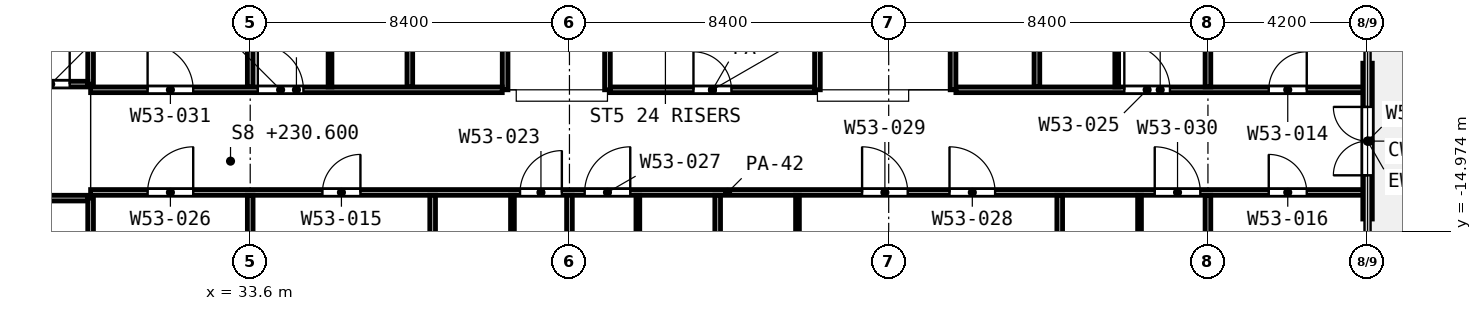
"""IFC4 building model, lengths in metres.
Left out: names, types, materials, properties, quantities, classifications, styles, units other than length and angle.
Written with IfcOpenShell. Run it as: python <this file> out.ifc"""

import sys

from ifc_helpers import new_model, si_unit, direction, frame, frame_2d, origin, place, context, subcontext, project, spatial, rectangle, extrude, element, fill, save


model = new_model("IFC4")
c1 = context("Model", 3, precision=1e-05, world=origin(), true_north=direction((0.0, 1.0)))
c2 = subcontext(c1, "Body", "Model", "MODEL_VIEW")
j1 = project(units=[si_unit("LENGTHUNIT", "METRE"), si_unit("PLANEANGLEUNIT", "RADIAN")], contexts=[c1])
p1 = place(None, origin())
s1 = spatial("IfcSite", under=j1, at=p1, CompositionType="ELEMENT")
p2 = place(p1, origin())
s2 = spatial("IfcBuilding", under=s1, at=p2, CompositionType="ELEMENT")
p3 = place(p2, frame((0.0, 0.0, 230.6)))
s3 = spatial("IfcBuildingStorey", under=s2, at=p3, CompositionType="ELEMENT", Elevation=230.6)
p4 = place(p3, frame((63.0, -14.65, 0.0), z_axis=(0.0, 0.0, 1.0), x_axis=(0.0, 1.0, 0.0)))
e1 = element("IfcWall", 1, at=p4, inside=s3, PredefinedType="SOLIDWALL", context=c2, shape_type="SweptSolid", body=[
    extrude(rectangle(XDim=4.1, YDim=0.25, at=frame_2d((2.05, 0.0))), origin(), (0.0, 0.0, 1.0), 2.58),
])
p5 = place(p4, frame((1.15, 0.0, 0.0)))
e2 = element("IfcOpeningElement", 2, at=p5, cuts=e1, PredefinedType="OPENING", context=c2, shape_type="SweptSolid", body=[
    extrude(rectangle(XDim=1.8, YDim=2.1, at=frame_2d((0.9, 1.05))), frame((0.0, 0.135, 0.0), z_axis=(0.0, -1.0, 0.0), x_axis=(1.0, 0.0, 0.0)), (0.0, 0.0, 1.0), 0.27),
])
for number, where, z_axis, x_axis in (
    (3, (35.7, -11.175, 0.0), (0.0, 0.0, 1.0), (0.0, 1.0, 0.0)),
    (4, (40.5, -16.65, 0.0), (0.0, 0.0, 1.0), (0.0, 1.0, 0.0)),
    (5, (43.8, -16.65, 0.0), (0.0, 0.0, 1.0), (0.0, 1.0, 0.0)),
    (6, (48.0, -16.65, 0.0), (0.0, 0.0, 1.0), (0.0, 1.0, 0.0)),
    (7, (56.4, -11.175, 0.0), (0.0, 0.0, 1.0), (0.0, 1.0, 0.0)),
    (8, (57.0, -16.65, 0.0), (0.0, 0.0, 1.0), (0.0, 1.0, 0.0)),
):
    element("IfcWall", number, at=place(p3, frame(where, z_axis=z_axis, x_axis=x_axis)), inside=s3, PredefinedType="PARTITIONING", context=c2, shape_type="SweptSolid", body=[
        extrude(rectangle(XDim=2.625, YDim=0.1, at=frame_2d((1.312, 0.0))), origin(), (0.0, 0.0, 1.0), 3.6),
    ])
p6 = place(p3, frame((24.8, -14.1, 0.0), z_axis=(0.0, 0.0, 1.0), x_axis=(1.0, 0.0, 0.0)))
e9 = element("IfcWall", 9, at=p6, inside=s3, PredefinedType="PARTITIONING", context=c2, shape_type="SweptSolid", body=[
    extrude(rectangle(XDim=4.525, YDim=0.15, at=frame_2d((2.262, 0.0))), origin(), (0.0, 0.0, 1.0), 3.6),
])
p7 = place(p6, frame((1.75, 0.0, 0.0)))
e10 = element("IfcOpeningElement", 10, at=p7, cuts=e9, PredefinedType="OPENING", context=c2, shape_type="SweptSolid", body=[
    extrude(rectangle(XDim=1.5, YDim=2.1, at=frame_2d((0.75, 1.05))), frame((0.0, 0.085, 0.0), z_axis=(0.0, -1.0, 0.0), x_axis=(1.0, 0.0, 0.0)), (0.0, 0.0, 1.0), 0.17),
])
p8 = place(p3, frame((29.4, -13.95, 0.0), z_axis=(0.0, 0.0, 1.0), x_axis=(1.0, 0.0, 0.0)))
e11 = element("IfcWall", 11, at=p8, inside=s3, PredefinedType="PARTITIONING", context=c2, shape_type="SweptSolid", body=[
    extrude(rectangle(XDim=33.52, YDim=0.15, at=frame_2d((16.76, 0.0))), origin(), (0.0, 0.0, 1.0), 2.7),
])
p9 = place(p8, frame((1.5, 0.0, 0.0)))
e12 = element("IfcOpeningElement", 12, at=p9, cuts=e11, PredefinedType="OPENING", context=c2, shape_type="SweptSolid", body=[
    extrude(rectangle(XDim=1.2, YDim=2.1, at=frame_2d((0.6, 1.05))), frame((0.0, 0.085, 0.0), z_axis=(0.0, -1.0, 0.0), x_axis=(1.0, 0.0, 0.0)), (0.0, 0.0, 1.0), 0.17),
])
p10 = place(p8, frame((6.1, 0.0, 0.0)))
e13 = element("IfcOpeningElement", 13, at=p10, cuts=e11, PredefinedType="OPENING", context=c2, shape_type="SweptSolid", body=[
    extrude(rectangle(XDim=1.0, YDim=2.1, at=frame_2d((0.5, 1.05))), frame((0.0, 0.085, 0.0), z_axis=(0.0, -1.0, 0.0), x_axis=(1.0, 0.0, 0.0)), (0.0, 0.0, 1.0), 0.17),
])
p11 = place(p8, frame((11.3, 0.0, 0.0)))
e14 = element("IfcOpeningElement", 14, at=p11, cuts=e11, PredefinedType="OPENING", context=c2, shape_type="SweptSolid", body=[
    extrude(rectangle(XDim=1.1, YDim=2.1, at=frame_2d((0.55, 1.05))), frame((0.0, 0.085, 0.0), z_axis=(0.0, -1.0, 0.0), x_axis=(1.0, 0.0, 0.0)), (0.0, 0.0, 1.0), 0.17),
])
p12 = place(p8, frame((13.0, 0.0, 0.0)))
e15 = element("IfcOpeningElement", 15, at=p12, cuts=e11, PredefinedType="OPENING", context=c2, shape_type="SweptSolid", body=[
    extrude(rectangle(XDim=1.2, YDim=2.1, at=frame_2d((0.6, 1.05))), frame((0.0, 0.085, 0.0), z_axis=(0.0, -1.0, 0.0), x_axis=(1.0, 0.0, 0.0)), (0.0, 0.0, 1.0), 0.17),
])
p13 = place(p8, frame((22.6, 0.0, 0.0)))
e16 = element("IfcOpeningElement", 16, at=p13, cuts=e11, PredefinedType="OPENING", context=c2, shape_type="SweptSolid", body=[
    extrude(rectangle(XDim=1.2, YDim=2.1, at=frame_2d((0.6, 1.05))), frame((0.0, 0.085, 0.0), z_axis=(0.0, -1.0, 0.0), x_axis=(1.0, 0.0, 0.0)), (0.0, 0.0, 1.0), 0.17),
])
p14 = place(p8, frame((20.3, 0.0, 0.0)))
e17 = element("IfcOpeningElement", 17, at=p14, cuts=e11, PredefinedType="OPENING", context=c2, shape_type="SweptSolid", body=[
    extrude(rectangle(XDim=1.2, YDim=2.1, at=frame_2d((0.6, 1.05))), frame((0.0, 0.085, 0.0), z_axis=(0.0, -1.0, 0.0), x_axis=(1.0, 0.0, 0.0)), (0.0, 0.0, 1.0), 0.17),
])
p15 = place(p8, frame((28.0, 0.0, 0.0)))
e18 = element("IfcOpeningElement", 18, at=p15, cuts=e11, PredefinedType="OPENING", context=c2, shape_type="SweptSolid", body=[
    extrude(rectangle(XDim=1.2, YDim=2.1, at=frame_2d((0.6, 1.05))), frame((0.0, 0.085, 0.0), z_axis=(0.0, -1.0, 0.0), x_axis=(1.0, 0.0, 0.0)), (0.0, 0.0, 1.0), 0.17),
])
p16 = place(p8, frame((31.0, 0.0, 0.0)))
e19 = element("IfcOpeningElement", 19, at=p16, cuts=e11, PredefinedType="OPENING", context=c2, shape_type="SweptSolid", body=[
    extrude(rectangle(XDim=1.0, YDim=2.1, at=frame_2d((0.5, 1.05))), frame((0.0, 0.085, 0.0), z_axis=(0.0, -1.0, 0.0), x_axis=(1.0, 0.0, 0.0)), (0.0, 0.0, 1.0), 0.17),
])
p17 = place(p3, frame((29.4, -11.25, 0.0), z_axis=(0.0, 0.0, 1.0), x_axis=(1.0, 0.0, 0.0)))
e20 = element("IfcWall", 20, at=p17, inside=s3, PredefinedType="PARTITIONING", context=c2, shape_type="SweptSolid", body=[
    extrude(rectangle(XDim=10.832, YDim=0.15, at=frame_2d((5.416, 0.0))), origin(), (0.0, 0.0, 1.0), 3.6),
])
p18 = place(p17, frame((4.4, 0.0, 0.0)))
e21 = element("IfcOpeningElement", 21, at=p18, cuts=e20, PredefinedType="OPENING", context=c2, shape_type="SweptSolid", body=[
    extrude(rectangle(XDim=1.2, YDim=2.1, at=frame_2d((0.6, 1.05))), frame((0.0, 0.085, 0.0), z_axis=(0.0, -1.0, 0.0), x_axis=(1.0, 0.0, 0.0)), (0.0, 0.0, 1.0), 0.17),
])
p19 = place(p17, frame((1.5, 0.0, 0.0)))
e22 = element("IfcOpeningElement", 22, at=p19, cuts=e20, PredefinedType="OPENING", context=c2, shape_type="SweptSolid", body=[
    extrude(rectangle(XDim=1.2, YDim=2.1, at=frame_2d((0.6, 1.05))), frame((0.0, 0.085, 0.0), z_axis=(0.0, -1.0, 0.0), x_axis=(1.0, 0.0, 0.0)), (0.0, 0.0, 1.0), 0.17),
])
p20 = place(p3, frame((43.075, -11.25, 0.0), z_axis=(0.0, 0.0, 1.0), x_axis=(1.0, 0.0, 0.0)))
e23 = element("IfcWall", 23, at=p20, inside=s3, PredefinedType="PARTITIONING", context=c2, shape_type="SweptSolid", body=[
    extrude(rectangle(XDim=5.375, YDim=0.15, at=frame_2d((2.688, 0.0))), origin(), (0.0, 0.0, 1.0), 3.6),
])
p21 = place(p20, frame((2.188, 0.0, 0.0)))
e24 = element("IfcOpeningElement", 24, at=p21, cuts=e23, PredefinedType="OPENING", context=c2, shape_type="SweptSolid", body=[
    extrude(rectangle(XDim=1.0, YDim=2.1, at=frame_2d((0.5, 1.05))), frame((0.0, 0.085, 0.0), z_axis=(0.0, -1.0, 0.0), x_axis=(1.0, 0.0, 0.0)), (0.0, 0.0, 1.0), 0.17),
])
p22 = place(p3, frame((52.168, -11.25, 0.0), z_axis=(0.0, 0.0, 1.0), x_axis=(1.0, 0.0, 0.0)))
e25 = element("IfcWall", 25, at=p22, inside=s3, PredefinedType="PARTITIONING", context=c2, shape_type="SweptSolid", body=[
    extrude(rectangle(XDim=10.752, YDim=0.15, at=frame_2d((5.376, 0.0))), origin(), (0.0, 0.0, 1.0), 2.7),
])
p23 = place(p22, frame((4.432, 0.0, 0.0)))
e26 = element("IfcOpeningElement", 26, at=p23, cuts=e25, PredefinedType="OPENING", context=c2, shape_type="SweptSolid", body=[
    extrude(rectangle(XDim=1.2, YDim=2.1, at=frame_2d((0.6, 1.05))), frame((0.0, 0.085, 0.0), z_axis=(0.0, -1.0, 0.0), x_axis=(1.0, 0.0, 0.0)), (0.0, 0.0, 1.0), 0.17),
])
p24 = place(p22, frame((8.232, 0.0, 0.0)))
e27 = element("IfcOpeningElement", 27, at=p24, cuts=e25, PredefinedType="OPENING", context=c2, shape_type="SweptSolid", body=[
    extrude(rectangle(XDim=1.0, YDim=2.1, at=frame_2d((0.5, 1.05))), frame((0.0, 0.085, 0.0), z_axis=(0.0, -1.0, 0.0), x_axis=(1.0, 0.0, 0.0)), (0.0, 0.0, 1.0), 0.17),
])
p25 = place(p3, frame((24.8, -11.1, 0.0), z_axis=(0.0, 0.0, 1.0), x_axis=(1.0, 0.0, 0.0)))
e28 = element("IfcWall", 28, at=p25, inside=s3, PredefinedType="PARTITIONING", context=c2, shape_type="SweptSolid", body=[
    extrude(rectangle(XDim=4.525, YDim=0.15, at=frame_2d((2.262, 0.0))), origin(), (0.0, 0.0, 1.0), 3.6),
])
p26 = place(p25, frame((1.0, 0.0, 0.0)))
e29 = element("IfcOpeningElement", 29, at=p26, cuts=e28, PredefinedType="OPENING", context=c2, shape_type="SweptSolid", body=[
    extrude(rectangle(XDim=0.9, YDim=2.1, at=frame_2d((0.45, 1.05))), frame((0.0, 0.085, 0.0), z_axis=(0.0, -1.0, 0.0), x_axis=(1.0, 0.0, 0.0)), (0.0, 0.0, 1.0), 0.17),
])
p27 = place(p25, frame((3.05, 0.0, 0.0)))
e30 = element("IfcOpeningElement", 30, at=p27, cuts=e28, PredefinedType="OPENING", context=c2, shape_type="SweptSolid", body=[
    extrude(rectangle(XDim=1.0, YDim=2.1, at=frame_2d((0.5, 1.05))), frame((0.0, 0.085, 0.0), z_axis=(0.0, -1.0, 0.0), x_axis=(1.0, 0.0, 0.0)), (0.0, 0.0, 1.0), 0.17),
])
p28 = place(p3, frame((29.4, -25.2, 0.0), z_axis=(0.0, 0.0, 1.0), x_axis=(0.0, 1.0, 0.0)))
e31 = element("IfcWall", 31, at=p28, inside=s3, PredefinedType="PARTITIONING", context=c2, shape_type="SweptSolid", body=[
    extrude(rectangle(XDim=11.1, YDim=0.15, at=frame_2d((5.55, 0.0))), origin(), (0.0, 0.0, 1.0), 3.6),
])
p29 = place(p3, frame((29.4, -11.1, 0.0), z_axis=(0.0, 0.0, 1.0), x_axis=(0.0, 1.0, 0.0)))
e32 = element("IfcWall", 32, at=p29, inside=s3, PredefinedType="PARTITIONING", context=c2, shape_type="SweptSolid", body=[
    extrude(rectangle(XDim=11.02, YDim=0.15, at=frame_2d((5.51, 0.0))), origin(), (0.0, 0.0, 1.0), 3.6),
])
p30 = place(p3, frame((33.6, -25.12, 0.0), z_axis=(0.0, 0.0, 1.0), x_axis=(0.0, 1.0, 0.0)))
e33 = element("IfcWall", 33, at=p30, inside=s3, PredefinedType="PARTITIONING", context=c2, shape_type="SweptSolid", body=[
    extrude(rectangle(XDim=11.095, YDim=0.15, at=frame_2d((5.548, 0.0))), origin(), (0.0, 0.0, 1.0), 3.6),
])
for number, where, z_axis, x_axis in (
    (34, (33.6, -11.175, 0.0), (0.0, 0.0, 1.0), (0.0, 1.0, 0.0)),
    (35, (37.8, -11.175, 0.0), (0.0, 0.0, 1.0), (0.0, 1.0, 0.0)),
):
    element("IfcWall", number, at=place(p3, frame(where, z_axis=z_axis, x_axis=x_axis)), inside=s3, PredefinedType="PARTITIONING", context=c2, shape_type="SweptSolid", body=[
        extrude(rectangle(XDim=11.095, YDim=0.15, at=frame_2d((5.547, 0.0))), origin(), (0.0, 0.0, 1.0), 3.6),
    ])
p31 = place(p3, frame((38.4, -25.12, 0.0), z_axis=(0.0, 0.0, 1.0), x_axis=(0.0, 1.0, 0.0)))
e36 = element("IfcWall", 36, at=p31, inside=s3, PredefinedType="PARTITIONING", context=c2, shape_type="SweptSolid", body=[
    extrude(rectangle(XDim=11.095, YDim=0.15, at=frame_2d((5.548, 0.0))), origin(), (0.0, 0.0, 1.0), 3.6),
])
p32 = place(p3, frame((40.307, -11.25, 0.0), z_axis=(0.0, 0.0, 1.0), x_axis=(0.0, 1.0, 0.0)))
e37 = element("IfcWall", 37, at=p32, inside=s3, PredefinedType="PARTITIONING", context=c2, shape_type="SweptSolid", body=[
    extrude(rectangle(XDim=11.17, YDim=0.15, at=frame_2d((5.585, 0.0))), origin(), (0.0, 0.0, 1.0), 3.6),
])
p33 = place(p32, frame((5.125, 0.0, 0.0)))
e38 = element("IfcOpeningElement", 38, at=p33, cuts=e37, PredefinedType="OPENING", context=c2, shape_type="SweptSolid", body=[
    extrude(rectangle(XDim=1.0, YDim=2.1, at=frame_2d((0.5, 1.05))), frame((0.0, 0.085, 0.0), z_axis=(0.0, -1.0, 0.0), x_axis=(1.0, 0.0, 0.0)), (0.0, 0.0, 1.0), 0.17),
])
p34 = place(p3, frame((42.0, -25.12, 0.0), z_axis=(0.0, 0.0, 1.0), x_axis=(0.0, 1.0, 0.0)))
e39 = element("IfcWall", 39, at=p34, inside=s3, PredefinedType="PARTITIONING", context=c2, shape_type="SweptSolid", body=[
    extrude(rectangle(XDim=11.095, YDim=0.15, at=frame_2d((5.548, 0.0))), origin(), (0.0, 0.0, 1.0), 3.6),
])
p35 = place(p3, frame((43.0, -11.25, 0.0), z_axis=(0.0, 0.0, 1.0), x_axis=(0.0, 1.0, 0.0)))
e40 = element("IfcWall", 40, at=p35, inside=s3, PredefinedType="PARTITIONING", context=c2, shape_type="SweptSolid", body=[
    extrude(rectangle(XDim=2.398, YDim=0.15, at=frame_2d((1.199, 0.0))), origin(), (0.0, 0.0, 1.0), 3.6),
])
p36 = place(p3, frame((45.9, -25.12, 0.0), z_axis=(0.0, 0.0, 1.0), x_axis=(0.0, 1.0, 0.0)))
e41 = element("IfcWall", 41, at=p36, inside=s3, PredefinedType="PARTITIONING", context=c2, shape_type="SweptSolid", body=[
    extrude(rectangle(XDim=11.095, YDim=0.15, at=frame_2d((5.548, 0.0))), origin(), (0.0, 0.0, 1.0), 3.6),
])
p37 = place(p3, frame((48.525, -11.25, 0.0), z_axis=(0.0, 0.0, 1.0), x_axis=(0.0, 1.0, 0.0)))
e42 = element("IfcWall", 42, at=p37, inside=s3, PredefinedType="PARTITIONING", context=c2, shape_type="SweptSolid", body=[
    extrude(rectangle(XDim=2.6, YDim=0.15, at=frame_2d((1.3, 0.0))), origin(), (0.0, 0.0, 1.0), 3.6),
])
p38 = place(p3, frame((52.093, -11.25, 0.0), z_axis=(0.0, 0.0, 1.0), x_axis=(0.0, 1.0, 0.0)))
e43 = element("IfcWall", 43, at=p38, inside=s3, PredefinedType="PARTITIONING", context=c2, shape_type="SweptSolid", body=[
    extrude(rectangle(XDim=9.397, YDim=0.15, at=frame_2d((4.698, 0.0))), origin(), (0.0, 0.0, 1.0), 3.6),
])
p39 = place(p38, frame((4.199, 0.0, 0.0)))
e44 = element("IfcOpeningElement", 44, at=p39, cuts=e43, PredefinedType="OPENING", context=c2, shape_type="SweptSolid", body=[
    extrude(rectangle(XDim=1.0, YDim=2.1, at=frame_2d((0.5, 1.05))), frame((0.0, 0.085, 0.0), z_axis=(0.0, -1.0, 0.0), x_axis=(1.0, 0.0, 0.0)), (0.0, 0.0, 1.0), 0.17),
])
p40 = place(p3, frame((54.3, -11.175, 0.0), z_axis=(0.0, 0.0, 1.0), x_axis=(0.0, 1.0, 0.0)))
e45 = element("IfcWall", 45, at=p40, inside=s3, PredefinedType="PARTITIONING", context=c2, shape_type="SweptSolid", body=[
    extrude(rectangle(XDim=11.095, YDim=0.15, at=frame_2d((5.547, 0.0))), origin(), (0.0, 0.0, 1.0), 3.6),
])
p41 = place(p3, frame((54.9, -25.12, 0.0), z_axis=(0.0, 0.0, 1.0), x_axis=(0.0, 1.0, 0.0)))
e46 = element("IfcWall", 46, at=p41, inside=s3, PredefinedType="PARTITIONING", context=c2, shape_type="SweptSolid", body=[
    extrude(rectangle(XDim=11.095, YDim=0.15, at=frame_2d((5.548, 0.0))), origin(), (0.0, 0.0, 1.0), 3.6),
])
p42 = place(p3, frame((58.8, -23.287, 0.0), z_axis=(0.0, 0.0, 1.0), x_axis=(0.0, 1.0, 0.0)))
e47 = element("IfcWall", 47, at=p42, inside=s3, PredefinedType="PARTITIONING", context=c2, shape_type="SweptSolid", body=[
    extrude(rectangle(XDim=9.262, YDim=0.15, at=frame_2d((4.631, 0.0))), origin(), (0.0, 0.0, 1.0), 2.7),
])
p43 = place(p3, frame((58.8, -11.175, 0.0), z_axis=(0.0, 0.0, 1.0), x_axis=(0.0, 1.0, 0.0)))
e48 = element("IfcWall", 48, at=p43, inside=s3, PredefinedType="PARTITIONING", context=c2, shape_type="SweptSolid", body=[
    extrude(rectangle(XDim=9.262, YDim=0.15, at=frame_2d((4.631, 0.0))), origin(), (0.0, 0.0, 1.0), 2.7),
])
p44 = place(p5, origin())
e49 = element("IfcDoor", 49, at=p44, inside=s3, OperationType="DOUBLE_DOOR_SINGLE_SWING", PredefinedType="DOOR", context=c2, shape_type="SweptSolid", body=[
    extrude(rectangle(XDim=1.8, YDim=2.1, at=frame_2d((0.9, 1.05))), frame((0.0, 0.025, 0.0), z_axis=(0.0, -1.0, 0.0), x_axis=(1.0, 0.0, 0.0)), (0.0, 0.0, 1.0), 0.05),
])
fill(e2, e49)
p45 = place(p18, origin())
e50 = element("IfcDoor", 50, at=p45, inside=s3, OperationType="SINGLE_SWING_LEFT", PredefinedType="DOOR", context=c2, shape_type="SweptSolid", body=[
    extrude(rectangle(XDim=1.2, YDim=2.1, at=frame_2d((0.6, 1.05))), frame((0.0, 0.025, 0.0), z_axis=(0.0, -1.0, 0.0), x_axis=(1.0, 0.0, 0.0)), (0.0, 0.0, 1.0), 0.05),
])
fill(e21, e50)
p46 = place(p21, origin())
e51 = element("IfcDoor", 51, at=p46, inside=s3, OperationType="SINGLE_SWING_LEFT", PredefinedType="DOOR", context=c2, shape_type="SweptSolid", body=[
    extrude(rectangle(XDim=1.0, YDim=2.1, at=frame_2d((0.5, 1.05))), frame((0.0, 0.025, 0.0), z_axis=(0.0, -1.0, 0.0), x_axis=(1.0, 0.0, 0.0)), (0.0, 0.0, 1.0), 0.05),
])
fill(e24, e51)
p47 = place(p23, origin())
e52 = element("IfcDoor", 52, at=p47, inside=s3, OperationType="SINGLE_SWING_LEFT", PredefinedType="DOOR", context=c2, shape_type="SweptSolid", body=[
    extrude(rectangle(XDim=1.2, YDim=2.1, at=frame_2d((0.6, 1.05))), frame((0.0, 0.025, 0.0), z_axis=(0.0, -1.0, 0.0), x_axis=(1.0, 0.0, 0.0)), (0.0, 0.0, 1.0), 0.05),
])
fill(e26, e52)
p48 = place(p24, origin())
e53 = element("IfcDoor", 53, at=p48, inside=s3, OperationType="SINGLE_SWING_RIGHT", PredefinedType="DOOR", context=c2, shape_type="SweptSolid", body=[
    extrude(rectangle(XDim=1.0, YDim=2.1, at=frame_2d((0.5, 1.05))), frame((0.0, 0.025, 0.0), z_axis=(0.0, -1.0, 0.0), x_axis=(1.0, 0.0, 0.0)), (0.0, 0.0, 1.0), 0.05),
])
fill(e27, e53)
p49 = place(p9, origin())
e54 = element("IfcDoor", 54, at=p49, inside=s3, OperationType="SINGLE_SWING_RIGHT", PredefinedType="DOOR", context=c2, shape_type="SweptSolid", body=[
    extrude(rectangle(XDim=1.2, YDim=2.1, at=frame_2d((0.6, 1.05))), frame((0.0, 0.025, 0.0), z_axis=(0.0, -1.0, 0.0), x_axis=(1.0, 0.0, 0.0)), (0.0, 0.0, 1.0), 0.05),
])
fill(e12, e54)
p50 = place(p10, origin())
e55 = element("IfcDoor", 55, at=p50, inside=s3, OperationType="SINGLE_SWING_RIGHT", PredefinedType="DOOR", context=c2, shape_type="SweptSolid", body=[
    extrude(rectangle(XDim=1.0, YDim=2.1, at=frame_2d((0.5, 1.05))), frame((0.0, 0.025, 0.0), z_axis=(0.0, -1.0, 0.0), x_axis=(1.0, 0.0, 0.0)), (0.0, 0.0, 1.0), 0.05),
])
fill(e13, e55)
p51 = place(p11, origin())
e56 = element("IfcDoor", 56, at=p51, inside=s3, OperationType="SINGLE_SWING_RIGHT", PredefinedType="DOOR", context=c2, shape_type="SweptSolid", body=[
    extrude(rectangle(XDim=1.1, YDim=2.1, at=frame_2d((0.55, 1.05))), frame((0.0, 0.025, 0.0), z_axis=(0.0, -1.0, 0.0), x_axis=(1.0, 0.0, 0.0)), (0.0, 0.0, 1.0), 0.05),
])
fill(e14, e56)
p52 = place(p12, origin())
e57 = element("IfcDoor", 57, at=p52, inside=s3, OperationType="SINGLE_SWING_RIGHT", PredefinedType="DOOR", context=c2, shape_type="SweptSolid", body=[
    extrude(rectangle(XDim=1.2, YDim=2.1, at=frame_2d((0.6, 1.05))), frame((0.0, 0.025, 0.0), z_axis=(0.0, -1.0, 0.0), x_axis=(1.0, 0.0, 0.0)), (0.0, 0.0, 1.0), 0.05),
])
fill(e15, e57)
p53 = place(p13, origin())
e58 = element("IfcDoor", 58, at=p53, inside=s3, OperationType="SINGLE_SWING_LEFT", PredefinedType="DOOR", context=c2, shape_type="SweptSolid", body=[
    extrude(rectangle(XDim=1.2, YDim=2.1, at=frame_2d((0.6, 1.05))), frame((0.0, 0.025, 0.0), z_axis=(0.0, -1.0, 0.0), x_axis=(1.0, 0.0, 0.0)), (0.0, 0.0, 1.0), 0.05),
])
fill(e16, e58)
p54 = place(p14, origin())
e59 = element("IfcDoor", 59, at=p54, inside=s3, OperationType="SINGLE_SWING_LEFT", PredefinedType="DOOR", context=c2, shape_type="SweptSolid", body=[
    extrude(rectangle(XDim=1.2, YDim=2.1, at=frame_2d((0.6, 1.05))), frame((0.0, 0.025, 0.0), z_axis=(0.0, -1.0, 0.0), x_axis=(1.0, 0.0, 0.0)), (0.0, 0.0, 1.0), 0.05),
])
fill(e17, e59)
p55 = place(p15, origin())
e60 = element("IfcDoor", 60, at=p55, inside=s3, OperationType="SINGLE_SWING_LEFT", PredefinedType="DOOR", context=c2, shape_type="SweptSolid", body=[
    extrude(rectangle(XDim=1.2, YDim=2.1, at=frame_2d((0.6, 1.05))), frame((0.0, 0.025, 0.0), z_axis=(0.0, -1.0, 0.0), x_axis=(1.0, 0.0, 0.0)), (0.0, 0.0, 1.0), 0.05),
])
fill(e18, e60)
p56 = place(p16, origin())
e61 = element("IfcDoor", 61, at=p56, inside=s3, OperationType="SINGLE_SWING_LEFT", PredefinedType="DOOR", context=c2, shape_type="SweptSolid", body=[
    extrude(rectangle(XDim=1.0, YDim=2.1, at=frame_2d((0.5, 1.05))), frame((0.0, 0.025, 0.0), z_axis=(0.0, -1.0, 0.0), x_axis=(1.0, 0.0, 0.0)), (0.0, 0.0, 1.0), 0.05),
])
fill(e19, e61)
p57 = place(p27, origin())
e62 = element("IfcDoor", 62, at=p57, inside=s3, OperationType="SINGLE_SWING_RIGHT", PredefinedType="DOOR", context=c2, shape_type="SweptSolid", body=[
    extrude(rectangle(XDim=1.0, YDim=2.1, at=frame_2d((0.5, 1.05))), frame((0.0, 0.025, 0.0), z_axis=(0.0, -1.0, 0.0), x_axis=(1.0, 0.0, 0.0)), (0.0, 0.0, 1.0), 0.05),
])
fill(e30, e62)
p58 = place(p19, origin())
e63 = element("IfcDoor", 63, at=p58, inside=s3, OperationType="SINGLE_SWING_LEFT", PredefinedType="DOOR", context=c2, shape_type="SweptSolid", body=[
    extrude(rectangle(XDim=1.2, YDim=2.1, at=frame_2d((0.6, 1.05))), frame((0.0, 0.025, 0.0), z_axis=(0.0, -1.0, 0.0), x_axis=(1.0, 0.0, 0.0)), (0.0, 0.0, 1.0), 0.05),
])
fill(e22, e63)
save(model, sys.argv[1])
